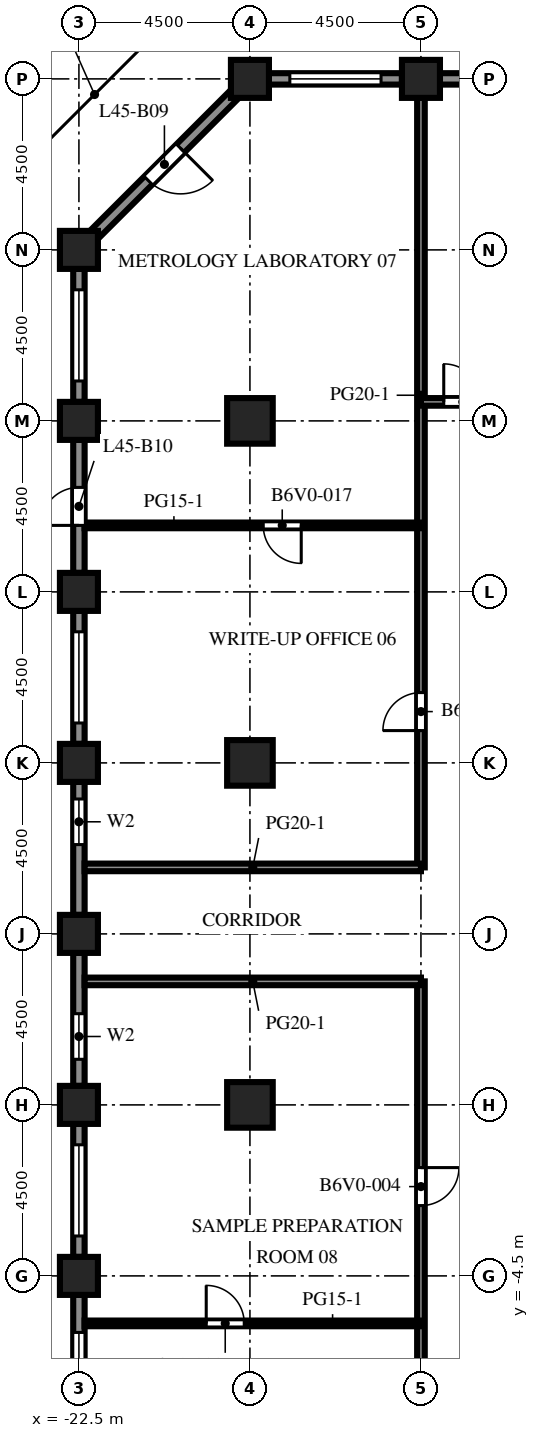
"""IFC4 building model, lengths in metres.
Left out: names, types, materials, properties, quantities, classifications, styles, units other than length and angle.
Written with IfcOpenShell. Run it as: python <this file> out.ifc"""

import sys

from ifc_helpers import new_model, si_unit, direction, frame, frame_2d, origin, origin_2d, place, context, subcontext, project, spatial, rectangle, extrude, element, fill, save


model = new_model("IFC4")
c1 = context("Model", 3, precision=1e-05, world=origin(), true_north=direction((0.0, 1.0)))
c2 = subcontext(c1, "Body", "Model", "MODEL_VIEW")
j1 = project(units=[si_unit("LENGTHUNIT", "METRE"), si_unit("PLANEANGLEUNIT", "RADIAN")], contexts=[c1])
p1 = place(None, origin())
s1 = spatial("IfcSite", under=j1, at=p1, CompositionType="ELEMENT")
p2 = place(p1, origin())
s2 = spatial("IfcBuilding", under=s1, at=p2, CompositionType="ELEMENT")
p3 = place(p2, frame((0.0, 0.0, 199.7)))
s3 = spatial("IfcBuildingStorey", under=s2, at=p3, CompositionType="ELEMENT", Elevation=199.7)
for number, where, z_axis, x_axis in (
    (1, (-22.5, -4.5, 0.0), (0.0, 0.0, 1.0), (1.0, 0.0, 0.0)),
    (2, (-22.5, 0.0, 0.0), (0.0, 0.0, 1.0), (1.0, 0.0, 0.0)),
    (3, (-22.5, 4.5, 0.0), (0.0, 0.0, 1.0), (1.0, 0.0, 0.0)),
    (4, (-22.5, 9.0, 0.0), (0.0, 0.0, 1.0), (1.0, 0.0, 0.0)),
    (5, (-22.5, 13.5, 0.0), (0.0, 0.0, 1.0), (1.0, 0.0, 0.0)),
    (6, (-22.5, 18.0, 0.0), (0.0, 0.0, 1.0), (1.0, 0.0, 0.0)),
    (7, (-22.5, 22.5, 0.0), (0.0, 0.0, 1.0), (1.0, 0.0, 0.0)),
    (8, (-18.0, 27.0, 0.0), (0.0, 0.0, 1.0), (1.0, 0.0, 0.0)),
    (9, (-13.5, 27.0, 0.0), (0.0, 0.0, 1.0), (1.0, 0.0, 0.0)),
):
    element("IfcColumn", number, at=place(p3, frame(where, z_axis=z_axis, x_axis=x_axis)), inside=s3, PredefinedType="COLUMN", context=c2, shape_type="SweptSolid", body=[
        extrude(rectangle(XDim=1.0, YDim=1.0, at=origin_2d()), origin(), (0.0, 0.0, 1.0), 4.1),
    ])
for number, where, z_axis, x_axis in (
    (10, (-18.0, 0.0, 0.0), (0.0, 0.0, 1.0), (1.0, 0.0, 0.0)),
    (11, (-18.0, 9.0, 0.0), (0.0, 0.0, 1.0), (1.0, 0.0, 0.0)),
    (12, (-18.0, 18.0, 0.0), (0.0, 0.0, 1.0), (1.0, 0.0, 0.0)),
):
    element("IfcColumn", number, at=place(p3, frame(where, z_axis=z_axis, x_axis=x_axis)), inside=s3, PredefinedType="COLUMN", context=c2, shape_type="SweptSolid", body=[
        extrude(rectangle(XDim=1.2, YDim=1.2, at=origin_2d()), origin(), (0.0, 0.0, 1.0), 4.1),
    ])
p4 = place(p3, frame((-13.0, 27.0, 0.0), z_axis=(0.0, 0.0, 1.0), x_axis=(1.0, 0.0, 0.0)))
e13 = element("IfcWall", 13, at=p4, inside=s3, PredefinedType="SOLIDWALL", context=c2, shape_type="SweptSolid", body=[
    extrude(rectangle(XDim=3.5, YDim=0.3, at=frame_2d((1.75, 0.0))), origin(), (0.0, 0.0, 1.0), 2.85),
])
p5 = place(p4, frame((1.25, 0.0, 0.0)))
e14 = element("IfcOpeningElement", 14, at=p5, cuts=e13, PredefinedType="OPENING", context=c2, shape_type="SweptSolid", body=[
    extrude(rectangle(XDim=1.0, YDim=2.2, at=frame_2d((0.5, 1.1))), frame((0.0, 0.16, 0.0), z_axis=(0.0, -1.0, 0.0), x_axis=(1.0, 0.0, 0.0)), (0.0, 0.0, 1.0), 0.32),
])
p6 = place(p3, frame((-17.5, 27.0, 0.0), z_axis=(0.0, 0.0, 1.0), x_axis=(1.0, 0.0, 0.0)))
e15 = element("IfcWall", 15, at=p6, inside=s3, PredefinedType="SOLIDWALL", context=c2, shape_type="SweptSolid", body=[
    extrude(rectangle(XDim=3.5, YDim=0.3, at=frame_2d((1.75, 0.0))), origin(), (0.0, 0.0, 1.0), 2.85),
])
p7 = place(p6, frame((0.55, 0.0, 0.8)))
e16 = element("IfcOpeningElement", 16, at=p7, cuts=e15, PredefinedType="OPENING", context=c2, shape_type="SweptSolid", body=[
    extrude(rectangle(XDim=2.4, YDim=1.7, at=frame_2d((1.2, 0.85))), frame((0.0, 0.16, 0.0), z_axis=(0.0, -1.0, 0.0), x_axis=(1.0, 0.0, 0.0)), (0.0, 0.0, 1.0), 0.32),
])
p8 = place(p3, frame((-22.106, 22.894, 0.0), z_axis=(0.0, 0.0, 1.0), x_axis=(0.707106781187, 0.707106781187, 0.0)))
e17 = element("IfcWall", 17, at=p8, inside=s3, PredefinedType="SOLIDWALL", context=c2, shape_type="SweptSolid", body=[
    extrude(rectangle(XDim=5.25, YDim=0.3, at=frame_2d((2.625, 0.0))), origin(), (0.0, 0.0, 1.0), 2.85),
])
p9 = place(p8, frame((2.025, 0.0, 0.0)))
e18 = element("IfcOpeningElement", 18, at=p9, cuts=e17, PredefinedType="OPENING", context=c2, shape_type="SweptSolid", body=[
    extrude(rectangle(XDim=1.2, YDim=2.2, at=frame_2d((0.6, 1.1))), frame((0.0, 0.16, 0.0), z_axis=(0.0, -1.0, 0.0), x_axis=(1.0, 0.0, 0.0)), (0.0, 0.0, 1.0), 0.32),
])
p10 = place(p3, frame((-22.5, 18.5, 0.0), z_axis=(0.0, 0.0, 1.0), x_axis=(0.0, 1.0, 0.0)))
e19 = element("IfcWall", 19, at=p10, inside=s3, PredefinedType="SOLIDWALL", context=c2, shape_type="SweptSolid", body=[
    extrude(rectangle(XDim=3.5, YDim=0.3, at=frame_2d((1.75, 0.0))), origin(), (0.0, 0.0, 1.0), 2.85),
])
p11 = place(p10, frame((0.55, 0.0, 0.8)))
e20 = element("IfcOpeningElement", 20, at=p11, cuts=e19, PredefinedType="OPENING", context=c2, shape_type="SweptSolid", body=[
    extrude(rectangle(XDim=2.4, YDim=1.7, at=frame_2d((1.2, 0.85))), frame((0.0, 0.16, 0.0), z_axis=(0.0, -1.0, 0.0), x_axis=(1.0, 0.0, 0.0)), (0.0, 0.0, 1.0), 0.32),
])
p12 = place(p3, frame((-22.5, 14.0, 0.0), z_axis=(0.0, 0.0, 1.0), x_axis=(0.0, 1.0, 0.0)))
e21 = element("IfcWall", 21, at=p12, inside=s3, PredefinedType="SOLIDWALL", context=c2, shape_type="SweptSolid", body=[
    extrude(rectangle(XDim=3.5, YDim=0.3, at=frame_2d((1.75, 0.0))), origin(), (0.0, 0.0, 1.0), 2.85),
])
p13 = place(p12, frame((1.25, 0.0, 0.0)))
e22 = element("IfcOpeningElement", 22, at=p13, cuts=e21, PredefinedType="OPENING", context=c2, shape_type="SweptSolid", body=[
    extrude(rectangle(XDim=1.0, YDim=2.2, at=frame_2d((0.5, 1.1))), frame((0.0, 0.16, 0.0), z_axis=(0.0, -1.0, 0.0), x_axis=(1.0, 0.0, 0.0)), (0.0, 0.0, 1.0), 0.32),
])
p14 = place(p3, frame((-22.5, 9.5, 0.0), z_axis=(0.0, 0.0, 1.0), x_axis=(0.0, 1.0, 0.0)))
e23 = element("IfcWall", 23, at=p14, inside=s3, PredefinedType="SOLIDWALL", context=c2, shape_type="SweptSolid", body=[
    extrude(rectangle(XDim=3.5, YDim=0.3, at=frame_2d((1.75, 0.0))), origin(), (0.0, 0.0, 1.0), 2.85),
])
p15 = place(p14, frame((0.55, 0.0, 0.8)))
e24 = element("IfcOpeningElement", 24, at=p15, cuts=e23, PredefinedType="OPENING", context=c2, shape_type="SweptSolid", body=[
    extrude(rectangle(XDim=2.4, YDim=1.7, at=frame_2d((1.2, 0.85))), frame((0.0, 0.16, 0.0), z_axis=(0.0, -1.0, 0.0), x_axis=(1.0, 0.0, 0.0)), (0.0, 0.0, 1.0), 0.32),
])
p16 = place(p3, frame((-22.5, 5.0, 0.0), z_axis=(0.0, 0.0, 1.0), x_axis=(0.0, 1.0, 0.0)))
e25 = element("IfcWall", 25, at=p16, inside=s3, PredefinedType="SOLIDWALL", context=c2, shape_type="SweptSolid", body=[
    extrude(rectangle(XDim=3.5, YDim=0.3, at=frame_2d((1.75, 0.0))), origin(), (0.0, 0.0, 1.0), 2.85),
])
p17 = place(p16, frame((1.85, 0.0, 0.8)))
e26 = element("IfcOpeningElement", 26, at=p17, cuts=e25, PredefinedType="OPENING", context=c2, shape_type="SweptSolid", body=[
    extrude(rectangle(XDim=1.2, YDim=1.7, at=frame_2d((0.6, 0.85))), frame((0.0, 0.16, 0.0), z_axis=(0.0, -1.0, 0.0), x_axis=(1.0, 0.0, 0.0)), (0.0, 0.0, 1.0), 0.32),
])
p18 = place(p3, frame((-22.5, 0.5, 0.0), z_axis=(0.0, 0.0, 1.0), x_axis=(0.0, 1.0, 0.0)))
e27 = element("IfcWall", 27, at=p18, inside=s3, PredefinedType="SOLIDWALL", context=c2, shape_type="SweptSolid", body=[
    extrude(rectangle(XDim=3.5, YDim=0.3, at=frame_2d((1.75, 0.0))), origin(), (0.0, 0.0, 1.0), 2.85),
])
p19 = place(p18, frame((0.7, 0.0, 0.8)))
e28 = element("IfcOpeningElement", 28, at=p19, cuts=e27, PredefinedType="OPENING", context=c2, shape_type="SweptSolid", body=[
    extrude(rectangle(XDim=1.2, YDim=1.7, at=frame_2d((0.6, 0.85))), frame((0.0, 0.16, 0.0), z_axis=(0.0, -1.0, 0.0), x_axis=(1.0, 0.0, 0.0)), (0.0, 0.0, 1.0), 0.32),
])
p20 = place(p3, frame((-22.5, -4.0, 0.0), z_axis=(0.0, 0.0, 1.0), x_axis=(0.0, 1.0, 0.0)))
e29 = element("IfcWall", 29, at=p20, inside=s3, PredefinedType="SOLIDWALL", context=c2, shape_type="SweptSolid", body=[
    extrude(rectangle(XDim=3.5, YDim=0.3, at=frame_2d((1.75, 0.0))), origin(), (0.0, 0.0, 1.0), 2.85),
])
p21 = place(p20, frame((0.55, 0.0, 0.8)))
e30 = element("IfcOpeningElement", 30, at=p21, cuts=e29, PredefinedType="OPENING", context=c2, shape_type="SweptSolid", body=[
    extrude(rectangle(XDim=2.4, YDim=1.7, at=frame_2d((1.2, 0.85))), frame((0.0, 0.16, 0.0), z_axis=(0.0, -1.0, 0.0), x_axis=(1.0, 0.0, 0.0)), (0.0, 0.0, 1.0), 0.32),
])
p22 = place(p3, frame((-22.5, -8.5, 0.0), z_axis=(0.0, 0.0, 1.0), x_axis=(0.0, 1.0, 0.0)))
e31 = element("IfcWall", 31, at=p22, inside=s3, PredefinedType="SOLIDWALL", context=c2, shape_type="SweptSolid", body=[
    extrude(rectangle(XDim=3.5, YDim=0.3, at=frame_2d((1.75, 0.0))), origin(), (0.0, 0.0, 1.0), 2.85),
])
p23 = place(p22, frame((0.113, 0.0, 0.8)))
e32 = element("IfcOpeningElement", 32, at=p23, cuts=e31, PredefinedType="OPENING", context=c2, shape_type="SweptSolid", body=[
    extrude(rectangle(XDim=2.4, YDim=1.7, at=frame_2d((1.2, 0.85))), frame((0.0, 0.16, 0.0), z_axis=(0.0, -1.0, 0.0), x_axis=(1.0, 0.0, 0.0)), (0.0, 0.0, 1.0), 0.32),
])
p24 = place(p3, frame((-13.5, -26.5, 0.0), z_axis=(0.0, 0.0, 1.0), x_axis=(0.0, 1.0, 0.0)))
e33 = element("IfcWall", 33, at=p24, inside=s3, PredefinedType="PARTITIONING", context=c2, shape_type="SweptSolid", body=[
    extrude(rectangle(XDim=29.75, YDim=0.2, at=frame_2d((14.875, 0.0))), origin(), (0.0, 0.0, 1.0), 3.65),
])
p25 = place(p24, frame((23.85, 0.0, 0.0)))
e34 = element("IfcOpeningElement", 34, at=p25, cuts=e33, PredefinedType="OPENING", context=c2, shape_type="SweptSolid", body=[
    extrude(rectangle(XDim=1.0, YDim=2.1, at=frame_2d((0.5, 1.05))), frame((0.0, 0.11, 0.0), z_axis=(0.0, -1.0, 0.0), x_axis=(1.0, 0.0, 0.0)), (0.0, 0.0, 1.0), 0.22),
])
p26 = place(p3, frame((-13.5, 6.25, 0.0), z_axis=(0.0, 0.0, 1.0), x_axis=(0.0, 1.0, 0.0)))
e35 = element("IfcWall", 35, at=p26, inside=s3, PredefinedType="PARTITIONING", context=c2, shape_type="SweptSolid", body=[
    extrude(rectangle(XDim=20.25, YDim=0.2, at=frame_2d((10.125, 0.0))), origin(), (0.0, 0.0, 1.0), 3.65),
])
p27 = place(p26, frame((3.6, 0.0, 0.0)))
e36 = element("IfcOpeningElement", 36, at=p27, cuts=e35, PredefinedType="OPENING", context=c2, shape_type="SweptSolid", body=[
    extrude(rectangle(XDim=1.0, YDim=2.1, at=frame_2d((0.5, 1.05))), frame((0.0, 0.11, 0.0), z_axis=(0.0, -1.0, 0.0), x_axis=(1.0, 0.0, 0.0)), (0.0, 0.0, 1.0), 0.22),
])
p28 = place(p3, frame((-13.5, -5.75, 0.0), z_axis=(0.0, 0.0, 1.0), x_axis=(-1.0, 0.0, 0.0)))
e37 = element("IfcWall", 37, at=p28, inside=s3, PredefinedType="PARTITIONING", context=c2, shape_type="SweptSolid", body=[
    extrude(rectangle(XDim=8.85, YDim=0.15, at=frame_2d((4.425, 0.0))), origin(), (0.0, 0.0, 1.0), 3.65),
])
p29 = place(p28, frame((4.65, 0.0, 0.0)))
e38 = element("IfcOpeningElement", 38, at=p29, cuts=e37, PredefinedType="OPENING", context=c2, shape_type="SweptSolid", body=[
    extrude(rectangle(XDim=1.0, YDim=2.1, at=frame_2d((0.5, 1.05))), frame((0.0, 0.085, 0.0), z_axis=(0.0, -1.0, 0.0), x_axis=(1.0, 0.0, 0.0)), (0.0, 0.0, 1.0), 0.17),
])
for number, where, z_axis, x_axis in (
    (39, (-22.35, 3.25, 0.0), (0.0, 0.0, 1.0), (1.0, 0.0, 0.0)),
    (40, (-22.35, 6.25, 0.0), (0.0, 0.0, 1.0), (1.0, 0.0, 0.0)),
):
    element("IfcWall", number, at=place(p3, frame(where, z_axis=z_axis, x_axis=x_axis)), inside=s3, PredefinedType="PARTITIONING", context=c2, shape_type="SweptSolid", body=[
        extrude(rectangle(XDim=8.85, YDim=0.2, at=frame_2d((4.425, 0.0))), origin(), (0.0, 0.0, 1.0), 3.65),
    ])
p30 = place(p3, frame((-22.35, 15.25, 0.0), z_axis=(0.0, 0.0, 1.0), x_axis=(1.0, 0.0, 0.0)))
e41 = element("IfcWall", 41, at=p30, inside=s3, PredefinedType="PARTITIONING", context=c2, shape_type="SweptSolid", body=[
    extrude(rectangle(XDim=8.85, YDim=0.15, at=frame_2d((4.425, 0.0))), origin(), (0.0, 0.0, 1.0), 3.65),
])
p31 = place(p30, frame((4.7, 0.0, 0.0)))
e42 = element("IfcOpeningElement", 42, at=p31, cuts=e41, PredefinedType="OPENING", context=c2, shape_type="SweptSolid", body=[
    extrude(rectangle(XDim=1.0, YDim=2.1, at=frame_2d((0.5, 1.05))), frame((0.0, 0.085, 0.0), z_axis=(0.0, -1.0, 0.0), x_axis=(1.0, 0.0, 0.0)), (0.0, 0.0, 1.0), 0.17),
])
p32 = place(p3, frame((-13.5, 18.5, 0.0), z_axis=(0.0, 0.0, 1.0), x_axis=(1.0, 0.0, 0.0)))
e43 = element("IfcWall", 43, at=p32, inside=s3, PredefinedType="PARTITIONING", context=c2, shape_type="SweptSolid", body=[
    extrude(rectangle(XDim=3.0, YDim=0.2, at=frame_2d((1.5, 0.0))), origin(), (0.0, 0.0, 1.0), 3.65),
])
p33 = place(p32, frame((0.6, 0.0, 0.0)))
e44 = element("IfcOpeningElement", 44, at=p33, cuts=e43, PredefinedType="OPENING", context=c2, shape_type="SweptSolid", body=[
    extrude(rectangle(XDim=1.0, YDim=2.1, at=frame_2d((0.5, 1.05))), frame((0.0, 0.11, 0.0), z_axis=(0.0, -1.0, 0.0), x_axis=(1.0, 0.0, 0.0)), (0.0, 0.0, 1.0), 0.22),
])
p34 = place(p7, origin())
e45 = element("IfcWindow", 45, at=p34, inside=s3, PartitioningType="SINGLE_PANEL", PredefinedType="WINDOW", context=c2, shape_type="SweptSolid", body=[
    extrude(rectangle(XDim=2.4, YDim=1.7, at=frame_2d((1.2, 0.85))), frame((0.0, 0.03, 0.0), z_axis=(0.0, -1.0, 0.0), x_axis=(1.0, 0.0, 0.0)), (0.0, 0.0, 1.0), 0.06),
])
fill(e16, e45)
p35 = place(p9, origin())
e46 = element("IfcDoor", 46, at=p35, inside=s3, OperationType="SINGLE_SWING_RIGHT", PredefinedType="DOOR", context=c2, shape_type="SweptSolid", body=[
    extrude(rectangle(XDim=1.2, YDim=2.2, at=frame_2d((0.6, 1.1))), frame((0.0, 0.025, 0.0), z_axis=(0.0, -1.0, 0.0), x_axis=(1.0, 0.0, 0.0)), (0.0, 0.0, 1.0), 0.05),
])
fill(e18, e46)
p36 = place(p11, origin())
e47 = element("IfcWindow", 47, at=p36, inside=s3, PartitioningType="SINGLE_PANEL", PredefinedType="WINDOW", context=c2, shape_type="SweptSolid", body=[
    extrude(rectangle(XDim=2.4, YDim=1.7, at=frame_2d((1.2, 0.85))), frame((0.0, 0.03, 0.0), z_axis=(0.0, -1.0, 0.0), x_axis=(1.0, 0.0, 0.0)), (0.0, 0.0, 1.0), 0.06),
])
fill(e20, e47)
p37 = place(p13, origin())
e48 = element("IfcDoor", 48, at=p37, inside=s3, OperationType="SINGLE_SWING_LEFT", PredefinedType="DOOR", context=c2, shape_type="SweptSolid", body=[
    extrude(rectangle(XDim=1.0, YDim=2.2, at=frame_2d((0.5, 1.1))), frame((0.0, 0.025, 0.0), z_axis=(0.0, -1.0, 0.0), x_axis=(1.0, 0.0, 0.0)), (0.0, 0.0, 1.0), 0.05),
])
fill(e22, e48)
p38 = place(p15, origin())
e49 = element("IfcWindow", 49, at=p38, inside=s3, PartitioningType="SINGLE_PANEL", PredefinedType="WINDOW", context=c2, shape_type="SweptSolid", body=[
    extrude(rectangle(XDim=2.4, YDim=1.7, at=frame_2d((1.2, 0.85))), frame((0.0, 0.03, 0.0), z_axis=(0.0, -1.0, 0.0), x_axis=(1.0, 0.0, 0.0)), (0.0, 0.0, 1.0), 0.06),
])
fill(e24, e49)
p39 = place(p17, origin())
e50 = element("IfcWindow", 50, at=p39, inside=s3, PartitioningType="SINGLE_PANEL", PredefinedType="WINDOW", context=c2, shape_type="SweptSolid", body=[
    extrude(rectangle(XDim=1.2, YDim=1.7, at=frame_2d((0.6, 0.85))), frame((0.0, 0.03, 0.0), z_axis=(0.0, -1.0, 0.0), x_axis=(1.0, 0.0, 0.0)), (0.0, 0.0, 1.0), 0.06),
])
fill(e26, e50)
p40 = place(p19, origin())
e51 = element("IfcWindow", 51, at=p40, inside=s3, PartitioningType="SINGLE_PANEL", PredefinedType="WINDOW", context=c2, shape_type="SweptSolid", body=[
    extrude(rectangle(XDim=1.2, YDim=1.7, at=frame_2d((0.6, 0.85))), frame((0.0, 0.03, 0.0), z_axis=(0.0, -1.0, 0.0), x_axis=(1.0, 0.0, 0.0)), (0.0, 0.0, 1.0), 0.06),
])
fill(e28, e51)
p41 = place(p21, origin())
e52 = element("IfcWindow", 52, at=p41, inside=s3, PartitioningType="SINGLE_PANEL", PredefinedType="WINDOW", context=c2, shape_type="SweptSolid", body=[
    extrude(rectangle(XDim=2.4, YDim=1.7, at=frame_2d((1.2, 0.85))), frame((0.0, 0.03, 0.0), z_axis=(0.0, -1.0, 0.0), x_axis=(1.0, 0.0, 0.0)), (0.0, 0.0, 1.0), 0.06),
])
fill(e30, e52)
p42 = place(p23, origin())
e53 = element("IfcWindow", 53, at=p42, inside=s3, PartitioningType="SINGLE_PANEL", PredefinedType="WINDOW", context=c2, shape_type="SweptSolid", body=[
    extrude(rectangle(XDim=2.4, YDim=1.7, at=frame_2d((1.2, 0.85))), frame((0.0, 0.03, 0.0), z_axis=(0.0, -1.0, 0.0), x_axis=(1.0, 0.0, 0.0)), (0.0, 0.0, 1.0), 0.06),
])
fill(e32, e53)
p43 = place(p25, origin())
e54 = element("IfcDoor", 54, at=p43, inside=s3, OperationType="SINGLE_SWING_RIGHT", PredefinedType="DOOR", context=c2, shape_type="SweptSolid", body=[
    extrude(rectangle(XDim=1.0, YDim=2.1, at=frame_2d((0.5, 1.05))), frame((0.0, 0.025, 0.0), z_axis=(0.0, -1.0, 0.0), x_axis=(1.0, 0.0, 0.0)), (0.0, 0.0, 1.0), 0.05),
])
fill(e34, e54)
p44 = place(p27, origin())
e55 = element("IfcDoor", 55, at=p44, inside=s3, OperationType="SINGLE_SWING_LEFT", PredefinedType="DOOR", context=c2, shape_type="SweptSolid", body=[
    extrude(rectangle(XDim=1.0, YDim=2.1, at=frame_2d((0.5, 1.05))), frame((0.0, 0.025, 0.0), z_axis=(0.0, -1.0, 0.0), x_axis=(1.0, 0.0, 0.0)), (0.0, 0.0, 1.0), 0.05),
])
fill(e36, e55)
p45 = place(p29, origin())
e56 = element("IfcDoor", 56, at=p45, inside=s3, OperationType="SINGLE_SWING_RIGHT", PredefinedType="DOOR", context=c2, shape_type="SweptSolid", body=[
    extrude(rectangle(XDim=1.0, YDim=2.1, at=frame_2d((0.5, 1.05))), frame((0.0, 0.025, 0.0), z_axis=(0.0, -1.0, 0.0), x_axis=(1.0, 0.0, 0.0)), (0.0, 0.0, 1.0), 0.05),
])
fill(e38, e56)
p46 = place(p31, origin())
e57 = element("IfcDoor", 57, at=p46, inside=s3, OperationType="SINGLE_SWING_RIGHT", PredefinedType="DOOR", context=c2, shape_type="SweptSolid", body=[
    extrude(rectangle(XDim=1.0, YDim=2.1, at=frame_2d((0.5, 1.05))), frame((0.0, 0.025, 0.0), z_axis=(0.0, -1.0, 0.0), x_axis=(1.0, 0.0, 0.0)), (0.0, 0.0, 1.0), 0.05),
])
fill(e42, e57)
p47 = place(p33, origin())
e58 = element("IfcDoor", 58, at=p47, inside=s3, OperationType="SINGLE_SWING_LEFT", PredefinedType="DOOR", context=c2, shape_type="SweptSolid", body=[
    extrude(rectangle(XDim=1.0, YDim=2.1, at=frame_2d((0.5, 1.05))), frame((0.0, 0.025, 0.0), z_axis=(0.0, -1.0, 0.0), x_axis=(1.0, 0.0, 0.0)), (0.0, 0.0, 1.0), 0.05),
])
fill(e44, e58)
save(model, sys.argv[1])
